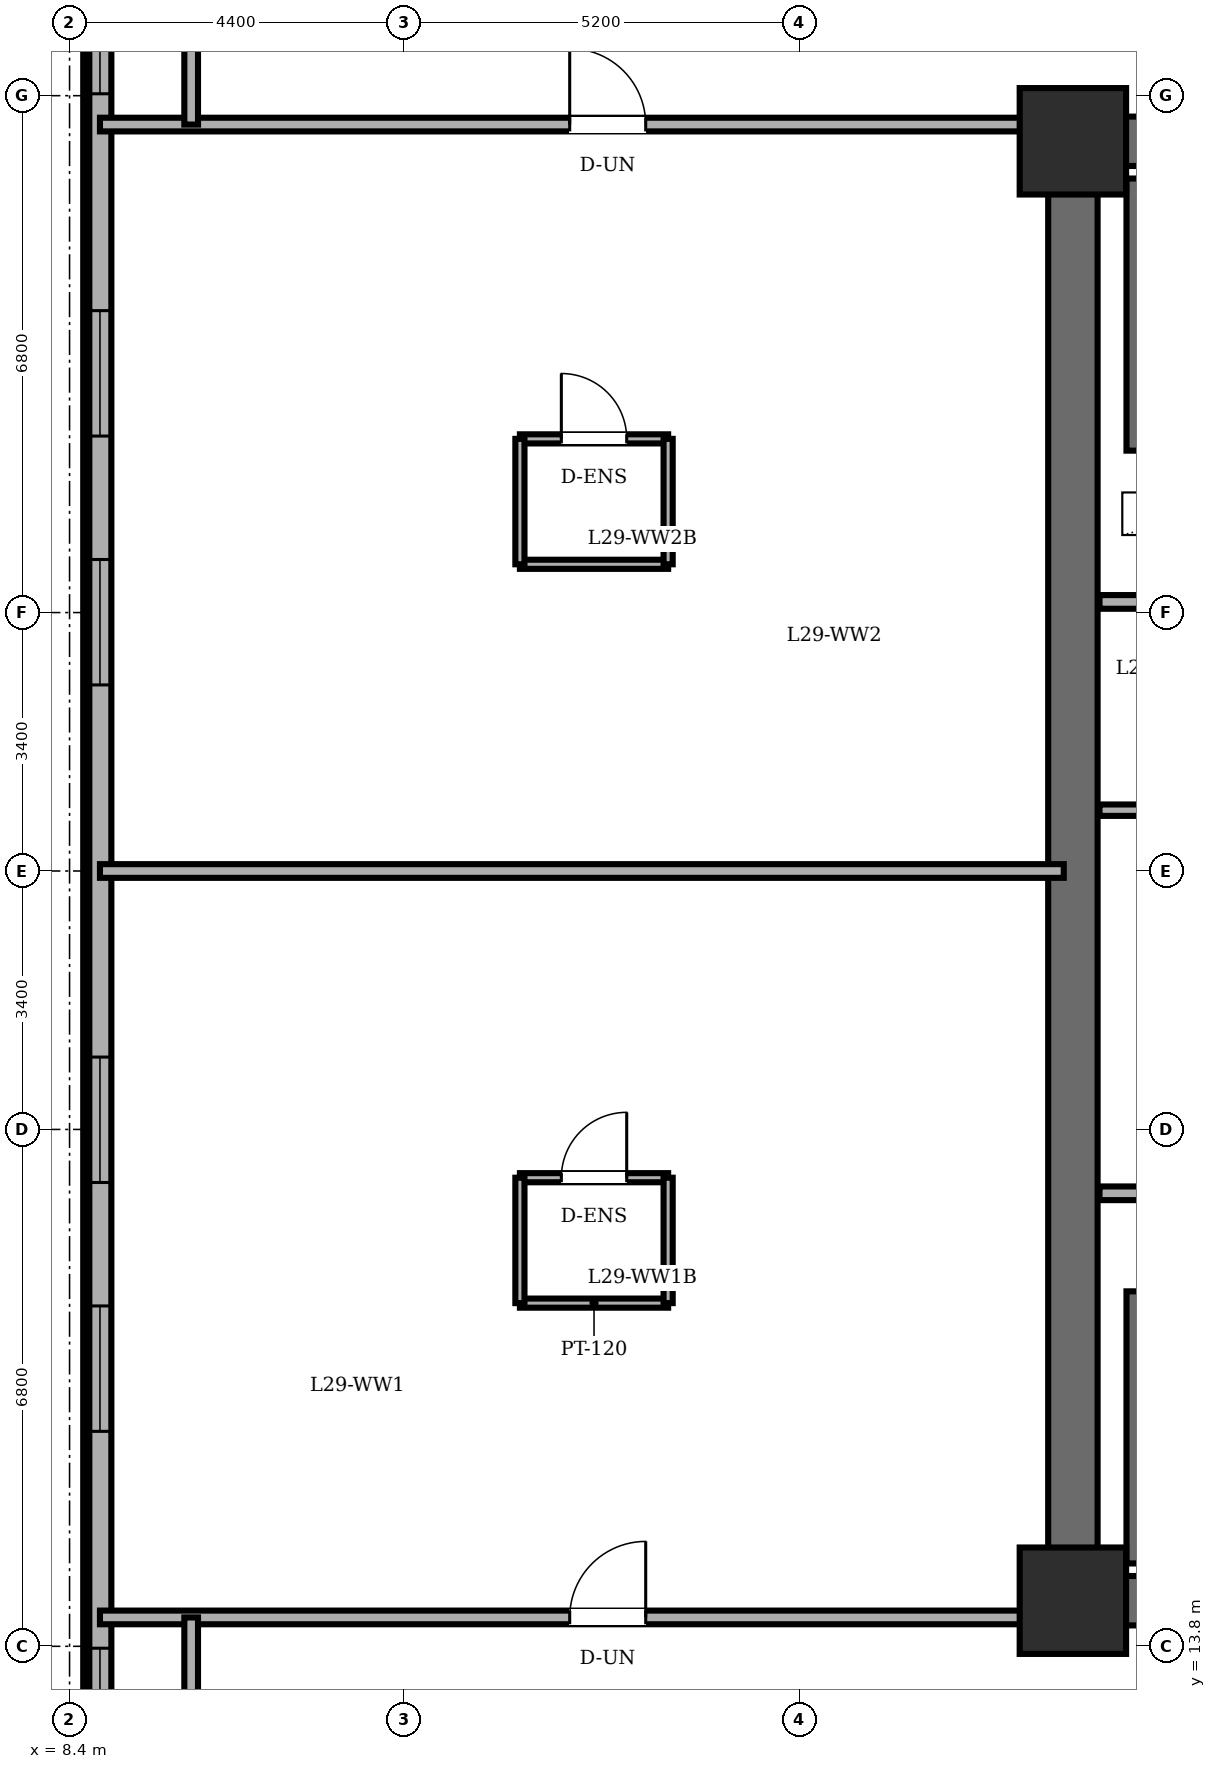
"""IFC4 building model, lengths in metres.
Left out: names, types, materials, properties, quantities, classifications, styles, units other than length and angle.
Written with IfcOpenShell. Run it as: python <this file> out.ifc"""

import sys

from ifc_helpers import new_model, si_unit, direction, frame, frame_2d, origin, origin_2d, place, context, subcontext, project, spatial, rectangle, extrude, element, fill, save


model = new_model("IFC4")
c1 = context("Model", 3, precision=1e-05, world=origin(), true_north=direction((0.0, 1.0)))
c2 = subcontext(c1, "Body", "Model", "MODEL_VIEW")
j1 = project(units=[si_unit("LENGTHUNIT", "METRE"), si_unit("PLANEANGLEUNIT", "RADIAN")], contexts=[c1])
p1 = place(None, origin())
s1 = spatial("IfcSite", under=j1, at=p1, CompositionType="ELEMENT")
p2 = place(p1, origin())
s2 = spatial("IfcBuilding", under=s1, at=p2, CompositionType="ELEMENT")
p3 = place(p2, frame((0.0, 0.0, 111.5)))
s3 = spatial("IfcBuildingStorey", under=s2, at=p3, CompositionType="ELEMENT", Elevation=111.5)
for number, where, z_axis, x_axis in (
    (1, (21.6, 14.4, 0.0), (0.0, 0.0, 1.0), (1.0, 0.0, 0.0)),
    (2, (21.6, 33.6, 0.0), (0.0, 0.0, 1.0), (1.0, 0.0, 0.0)),
):
    element("IfcColumn", number, at=place(p3, frame(where, z_axis=z_axis, x_axis=x_axis)), inside=s3, PredefinedType="COLUMN", context=c2, shape_type="SweptSolid", body=[
        extrude(rectangle(XDim=1.4, YDim=1.4, at=origin_2d()), origin(), (0.0, 0.0, 1.0), 3.6),
    ])
p4 = place(p3, frame((8.8, 38.2, 0.0), z_axis=(0.0, 0.0, 1.0), x_axis=(0.0, -1.0, 0.0)))
e3 = element("IfcWall", 3, at=p4, inside=s3, PredefinedType="SOLIDWALL", context=c2, shape_type="SweptSolid", body=[
    extrude(rectangle(XDim=28.4, YDim=0.3, at=frame_2d((14.2, 0.0))), origin(), (0.0, 0.0, 1.0), 3.4),
])
p5 = place(p4, frame((2.325, 0.0, 0.85)))
e4 = element("IfcOpeningElement", 4, at=p5, cuts=e3, PredefinedType="OPENING", context=c2, shape_type="SweptSolid", body=[
    extrude(rectangle(XDim=1.65, YDim=1.55, at=frame_2d((0.825, 0.775))), frame((0.0, 0.16, 0.0), z_axis=(0.0, -1.0, 0.0), x_axis=(1.0, 0.0, 0.0)), (0.0, 0.0, 1.0), 0.32),
])
p6 = place(p4, frame((6.828, 0.0, 0.85)))
e5 = element("IfcOpeningElement", 5, at=p6, cuts=e3, PredefinedType="OPENING", context=c2, shape_type="SweptSolid", body=[
    extrude(rectangle(XDim=1.65, YDim=1.55, at=frame_2d((0.825, 0.775))), frame((0.0, 0.16, 0.0), z_axis=(0.0, -1.0, 0.0), x_axis=(1.0, 0.0, 0.0)), (0.0, 0.0, 1.0), 0.32),
])
p7 = place(p4, frame((10.102, 0.0, 0.85)))
e6 = element("IfcOpeningElement", 6, at=p7, cuts=e3, PredefinedType="OPENING", context=c2, shape_type="SweptSolid", body=[
    extrude(rectangle(XDim=1.65, YDim=1.55, at=frame_2d((0.825, 0.775))), frame((0.0, 0.16, 0.0), z_axis=(0.0, -1.0, 0.0), x_axis=(1.0, 0.0, 0.0)), (0.0, 0.0, 1.0), 0.32),
])
p8 = place(p4, frame((16.648, 0.0, 0.85)))
e7 = element("IfcOpeningElement", 7, at=p8, cuts=e3, PredefinedType="OPENING", context=c2, shape_type="SweptSolid", body=[
    extrude(rectangle(XDim=1.65, YDim=1.55, at=frame_2d((0.825, 0.775))), frame((0.0, 0.16, 0.0), z_axis=(0.0, -1.0, 0.0), x_axis=(1.0, 0.0, 0.0)), (0.0, 0.0, 1.0), 0.32),
])
p9 = place(p4, frame((19.922, 0.0, 0.85)))
e8 = element("IfcOpeningElement", 8, at=p9, cuts=e3, PredefinedType="OPENING", context=c2, shape_type="SweptSolid", body=[
    extrude(rectangle(XDim=1.65, YDim=1.55, at=frame_2d((0.825, 0.775))), frame((0.0, 0.16, 0.0), z_axis=(0.0, -1.0, 0.0), x_axis=(1.0, 0.0, 0.0)), (0.0, 0.0, 1.0), 0.32),
])
p10 = place(p4, frame((24.425, 0.0, 0.85)))
e9 = element("IfcOpeningElement", 9, at=p10, cuts=e3, PredefinedType="OPENING", context=c2, shape_type="SweptSolid", body=[
    extrude(rectangle(XDim=1.65, YDim=1.55, at=frame_2d((0.825, 0.775))), frame((0.0, 0.16, 0.0), z_axis=(0.0, -1.0, 0.0), x_axis=(1.0, 0.0, 0.0)), (0.0, 0.0, 1.0), 0.32),
])
p11 = place(p3, frame((21.6, 14.4, 0.0), z_axis=(0.0, 0.0, 1.0), x_axis=(0.0, 1.0, 0.0)))
e10 = element("IfcWall", 10, at=p11, inside=s3, PredefinedType="SHEAR", context=c2, shape_type="SweptSolid", body=[
    extrude(rectangle(XDim=19.2, YDim=0.65, at=frame_2d((9.6, 0.0))), origin(), (0.0, 0.0, 1.0), 3.4),
])
for number, where, z_axis, x_axis in (
    (11, (21.6, 33.6, 0.0), (0.0, 0.0, 1.0), (1.0, 0.0, 0.0)),
    (12, (37.2, 14.4, 0.0), (0.0, 0.0, 1.0), (-1.0, 0.0, 0.0)),
):
    element("IfcWall", number, at=place(p3, frame(where, z_axis=z_axis, x_axis=x_axis)), inside=s3, PredefinedType="SHEAR", context=c2, shape_type="SweptSolid", body=[
        extrude(rectangle(XDim=15.6, YDim=0.65, at=frame_2d((7.8, 0.0))), origin(), (0.0, 0.0, 1.0), 3.4),
    ])
for number, where, z_axis, x_axis in (
    (13, (22.48, 29.53, 0.0), (0.0, 0.0, 1.0), (0.0, 1.0, 0.0)),
    (14, (22.48, 14.89, 0.0), (0.0, 0.0, 1.0), (0.0, 1.0, 0.0)),
):
    element("IfcWall", number, at=place(p3, frame(where, z_axis=z_axis, x_axis=x_axis)), inside=s3, PredefinedType="SOLIDWALL", context=c2, shape_type="SweptSolid", body=[
        extrude(rectangle(XDim=3.58, YDim=0.35, at=frame_2d((1.79, 0.0))), origin(), (0.0, 0.0, 1.0), 3.4),
    ])
p12 = place(p3, frame((21.95, 27.54, 0.0), z_axis=(0.0, 0.0, 1.0), x_axis=(1.0, 0.0, 0.0)))
e15 = element("IfcWall", 15, at=p12, inside=s3, PredefinedType="PARTITIONING", context=c2, shape_type="SweptSolid", body=[
    extrude(rectangle(XDim=10.56, YDim=0.18, at=frame_2d((5.28, 0.0))), origin(), (0.0, 0.0, 1.0), 3.4),
])
p13 = place(p3, frame((21.95, 19.76, 0.0), z_axis=(0.0, 0.0, 1.0), x_axis=(1.0, 0.0, 0.0)))
e16 = element("IfcWall", 16, at=p13, inside=s3, PredefinedType="PARTITIONING", context=c2, shape_type="SweptSolid", body=[
    extrude(rectangle(XDim=14.87, YDim=0.18, at=frame_2d((7.435, 0.0))), origin(), (0.0, 0.0, 1.0), 3.4),
])
p14 = place(p3, frame((21.95, 24.8, 0.0), z_axis=(0.0, 0.0, 1.0), x_axis=(1.0, 0.0, 0.0)))
e17 = element("IfcWall", 17, at=p14, inside=s3, PredefinedType="PARTITIONING", context=c2, shape_type="SweptSolid", body=[
    extrude(rectangle(XDim=2.51, YDim=0.15, at=frame_2d((1.255, 0.0))), origin(), (0.0, 0.0, 1.0), 3.4),
])
p15 = place(p3, frame((14.325, 19.965, 0.0), z_axis=(0.0, 0.0, 1.0), x_axis=(1.0, 0.0, 0.0)))
e18 = element("IfcWall", 18, at=p15, inside=s3, PredefinedType="PARTITIONING", context=c2, shape_type="SweptSolid", body=[
    extrude(rectangle(XDim=1.95, YDim=0.12, at=frame_2d((0.975, 0.0))), origin(), (0.0, 0.0, 1.0), 3.4),
])
p16 = place(p15, frame((0.545, 0.0, 0.0)))
e19 = element("IfcOpeningElement", 19, at=p16, cuts=e18, PredefinedType="OPENING", context=c2, shape_type="SweptSolid", body=[
    extrude(rectangle(XDim=0.86, YDim=2.1, at=frame_2d((0.43, 1.05))), frame((0.0, 0.07, 0.0), z_axis=(0.0, -1.0, 0.0), x_axis=(1.0, 0.0, 0.0)), (0.0, 0.0, 1.0), 0.14),
])
p17 = place(p3, frame((16.275, 18.315, 0.0), z_axis=(0.0, 0.0, 1.0), x_axis=(-1.0, 0.0, 0.0)))
e20 = element("IfcWall", 20, at=p17, inside=s3, PredefinedType="PARTITIONING", context=c2, shape_type="SweptSolid", body=[
    extrude(rectangle(XDim=1.95, YDim=0.12, at=frame_2d((0.975, 0.0))), origin(), (0.0, 0.0, 1.0), 3.4),
])
for number, where, z_axis, x_axis in (
    (21, (14.325, 19.965, 0.0), (0.0, 0.0, 1.0), (0.0, -1.0, 0.0)),
    (22, (16.275, 18.315, 0.0), (0.0, 0.0, 1.0), (0.0, 1.0, 0.0)),
):
    element("IfcWall", number, at=place(p3, frame(where, z_axis=z_axis, x_axis=x_axis)), inside=s3, PredefinedType="PARTITIONING", context=c2, shape_type="SweptSolid", body=[
        extrude(rectangle(XDim=1.65, YDim=0.12, at=frame_2d((0.825, 0.0))), origin(), (0.0, 0.0, 1.0), 3.4),
    ])
p18 = place(p3, frame((14.325, 29.685, 0.0), z_axis=(0.0, 0.0, 1.0), x_axis=(1.0, 0.0, 0.0)))
e23 = element("IfcWall", 23, at=p18, inside=s3, PredefinedType="PARTITIONING", context=c2, shape_type="SweptSolid", body=[
    extrude(rectangle(XDim=1.95, YDim=0.12, at=frame_2d((0.975, 0.0))), origin(), (0.0, 0.0, 1.0), 3.4),
])
p19 = place(p18, frame((0.545, 0.0, 0.0)))
e24 = element("IfcOpeningElement", 24, at=p19, cuts=e23, PredefinedType="OPENING", context=c2, shape_type="SweptSolid", body=[
    extrude(rectangle(XDim=0.86, YDim=2.1, at=frame_2d((0.43, 1.05))), frame((0.0, 0.07, 0.0), z_axis=(0.0, -1.0, 0.0), x_axis=(1.0, 0.0, 0.0)), (0.0, 0.0, 1.0), 0.14),
])
p20 = place(p3, frame((16.275, 28.035, 0.0), z_axis=(0.0, 0.0, 1.0), x_axis=(-1.0, 0.0, 0.0)))
e25 = element("IfcWall", 25, at=p20, inside=s3, PredefinedType="PARTITIONING", context=c2, shape_type="SweptSolid", body=[
    extrude(rectangle(XDim=1.95, YDim=0.12, at=frame_2d((0.975, 0.0))), origin(), (0.0, 0.0, 1.0), 3.4),
])
for number, where, z_axis, x_axis in (
    (26, (14.325, 29.685, 0.0), (0.0, 0.0, 1.0), (0.0, -1.0, 0.0)),
    (27, (16.275, 28.035, 0.0), (0.0, 0.0, 1.0), (0.0, 1.0, 0.0)),
):
    element("IfcWall", number, at=place(p3, frame(where, z_axis=z_axis, x_axis=x_axis)), inside=s3, PredefinedType="PARTITIONING", context=c2, shape_type="SweptSolid", body=[
        extrude(rectangle(XDim=1.65, YDim=0.12, at=frame_2d((0.825, 0.0))), origin(), (0.0, 0.0, 1.0), 3.4),
    ])
p21 = place(p3, frame((8.8, 14.18, 0.0), z_axis=(0.0, 0.0, 1.0), x_axis=(1.0, 0.0, 0.0)))
e28 = element("IfcWall", 28, at=p21, inside=s3, PredefinedType="PARTITIONING", context=c2, shape_type="SweptSolid", body=[
    extrude(rectangle(XDim=12.68, YDim=0.18, at=frame_2d((6.34, 0.0))), origin(), (0.0, 0.0, 1.0), 3.4),
])
p22 = place(p21, frame((6.18, 0.0, 0.0)))
e29 = element("IfcOpeningElement", 29, at=p22, cuts=e28, PredefinedType="OPENING", context=c2, shape_type="SweptSolid", body=[
    extrude(rectangle(XDim=1.0, YDim=2.15, at=frame_2d((0.5, 1.075))), frame((0.0, 0.1, 0.0), z_axis=(0.0, -1.0, 0.0), x_axis=(1.0, 0.0, 0.0)), (0.0, 0.0, 1.0), 0.2),
])
p23 = place(p3, frame((8.8, 24.0, 0.0), z_axis=(0.0, 0.0, 1.0), x_axis=(1.0, 0.0, 0.0)))
e30 = element("IfcWall", 30, at=p23, inside=s3, PredefinedType="PARTITIONING", context=c2, shape_type="SweptSolid", body=[
    extrude(rectangle(XDim=12.68, YDim=0.18, at=frame_2d((6.34, 0.0))), origin(), (0.0, 0.0, 1.0), 3.4),
])
p24 = place(p3, frame((8.8, 33.82, 0.0), z_axis=(0.0, 0.0, 1.0), x_axis=(1.0, 0.0, 0.0)))
e31 = element("IfcWall", 31, at=p24, inside=s3, PredefinedType="PARTITIONING", context=c2, shape_type="SweptSolid", body=[
    extrude(rectangle(XDim=12.68, YDim=0.18, at=frame_2d((6.34, 0.0))), origin(), (0.0, 0.0, 1.0), 3.4),
])
p25 = place(p24, frame((6.18, 0.0, 0.0)))
e32 = element("IfcOpeningElement", 32, at=p25, cuts=e31, PredefinedType="OPENING", context=c2, shape_type="SweptSolid", body=[
    extrude(rectangle(XDim=1.0, YDim=2.15, at=frame_2d((0.5, 1.075))), frame((0.0, 0.1, 0.0), z_axis=(0.0, -1.0, 0.0), x_axis=(1.0, 0.0, 0.0)), (0.0, 0.0, 1.0), 0.2),
])
for number, where, z_axis, x_axis in (
    (33, (10.0, 11.72, 0.0), (0.0, 0.0, 1.0), (0.0, 1.0, 0.0)),
    (34, (10.0, 33.82, 0.0), (0.0, 0.0, 1.0), (0.0, 1.0, 0.0)),
):
    element("IfcWall", number, at=place(p3, frame(where, z_axis=z_axis, x_axis=x_axis)), inside=s3, PredefinedType="PARTITIONING", context=c2, shape_type="SweptSolid", body=[
        extrude(rectangle(XDim=2.46, YDim=0.18, at=frame_2d((1.23, 0.0))), origin(), (0.0, 0.0, 1.0), 3.4),
    ])
p26 = place(p5, origin())
e35 = element("IfcWindow", 35, at=p26, inside=s3, PartitioningType="DOUBLE_PANEL_VERTICAL", PredefinedType="WINDOW", context=c2, shape_type="SweptSolid", body=[
    extrude(rectangle(XDim=1.65, YDim=1.55, at=frame_2d((0.825, 0.775))), frame((0.0, 0.03, 0.0), z_axis=(0.0, -1.0, 0.0), x_axis=(1.0, 0.0, 0.0)), (0.0, 0.0, 1.0), 0.06),
])
fill(e4, e35)
p27 = place(p6, origin())
e36 = element("IfcWindow", 36, at=p27, inside=s3, PartitioningType="DOUBLE_PANEL_VERTICAL", PredefinedType="WINDOW", context=c2, shape_type="SweptSolid", body=[
    extrude(rectangle(XDim=1.65, YDim=1.55, at=frame_2d((0.825, 0.775))), frame((0.0, 0.03, 0.0), z_axis=(0.0, -1.0, 0.0), x_axis=(1.0, 0.0, 0.0)), (0.0, 0.0, 1.0), 0.06),
])
fill(e5, e36)
p28 = place(p7, origin())
e37 = element("IfcWindow", 37, at=p28, inside=s3, PartitioningType="DOUBLE_PANEL_VERTICAL", PredefinedType="WINDOW", context=c2, shape_type="SweptSolid", body=[
    extrude(rectangle(XDim=1.65, YDim=1.55, at=frame_2d((0.825, 0.775))), frame((0.0, 0.03, 0.0), z_axis=(0.0, -1.0, 0.0), x_axis=(1.0, 0.0, 0.0)), (0.0, 0.0, 1.0), 0.06),
])
fill(e6, e37)
p29 = place(p8, origin())
e38 = element("IfcWindow", 38, at=p29, inside=s3, PartitioningType="DOUBLE_PANEL_VERTICAL", PredefinedType="WINDOW", context=c2, shape_type="SweptSolid", body=[
    extrude(rectangle(XDim=1.65, YDim=1.55, at=frame_2d((0.825, 0.775))), frame((0.0, 0.03, 0.0), z_axis=(0.0, -1.0, 0.0), x_axis=(1.0, 0.0, 0.0)), (0.0, 0.0, 1.0), 0.06),
])
fill(e7, e38)
p30 = place(p9, origin())
e39 = element("IfcWindow", 39, at=p30, inside=s3, PartitioningType="DOUBLE_PANEL_VERTICAL", PredefinedType="WINDOW", context=c2, shape_type="SweptSolid", body=[
    extrude(rectangle(XDim=1.65, YDim=1.55, at=frame_2d((0.825, 0.775))), frame((0.0, 0.03, 0.0), z_axis=(0.0, -1.0, 0.0), x_axis=(1.0, 0.0, 0.0)), (0.0, 0.0, 1.0), 0.06),
])
fill(e8, e39)
p31 = place(p10, origin())
e40 = element("IfcWindow", 40, at=p31, inside=s3, PartitioningType="DOUBLE_PANEL_VERTICAL", PredefinedType="WINDOW", context=c2, shape_type="SweptSolid", body=[
    extrude(rectangle(XDim=1.65, YDim=1.55, at=frame_2d((0.825, 0.775))), frame((0.0, 0.03, 0.0), z_axis=(0.0, -1.0, 0.0), x_axis=(1.0, 0.0, 0.0)), (0.0, 0.0, 1.0), 0.06),
])
fill(e9, e40)
p32 = place(p16, origin())
e41 = element("IfcDoor", 41, at=p32, inside=s3, OperationType="SINGLE_SWING_RIGHT", PredefinedType="DOOR", context=c2, shape_type="SweptSolid", body=[
    extrude(rectangle(XDim=0.86, YDim=2.1, at=frame_2d((0.43, 1.05))), frame((0.0, 0.025, 0.0), z_axis=(0.0, -1.0, 0.0), x_axis=(1.0, 0.0, 0.0)), (0.0, 0.0, 1.0), 0.05),
])
fill(e19, e41)
p33 = place(p19, origin())
e42 = element("IfcDoor", 42, at=p33, inside=s3, OperationType="SINGLE_SWING_LEFT", PredefinedType="DOOR", context=c2, shape_type="SweptSolid", body=[
    extrude(rectangle(XDim=0.86, YDim=2.1, at=frame_2d((0.43, 1.05))), frame((0.0, 0.025, 0.0), z_axis=(0.0, -1.0, 0.0), x_axis=(1.0, 0.0, 0.0)), (0.0, 0.0, 1.0), 0.05),
])
fill(e24, e42)
p34 = place(p22, origin())
e43 = element("IfcDoor", 43, at=p34, inside=s3, OperationType="SINGLE_SWING_RIGHT", PredefinedType="DOOR", context=c2, shape_type="SweptSolid", body=[
    extrude(rectangle(XDim=1.0, YDim=2.15, at=frame_2d((0.5, 1.075))), frame((0.0, 0.025, 0.0), z_axis=(0.0, -1.0, 0.0), x_axis=(1.0, 0.0, 0.0)), (0.0, 0.0, 1.0), 0.05),
])
fill(e29, e43)
p35 = place(p25, origin())
e44 = element("IfcDoor", 44, at=p35, inside=s3, OperationType="SINGLE_SWING_LEFT", PredefinedType="DOOR", context=c2, shape_type="SweptSolid", body=[
    extrude(rectangle(XDim=1.0, YDim=2.15, at=frame_2d((0.5, 1.075))), frame((0.0, 0.025, 0.0), z_axis=(0.0, -1.0, 0.0), x_axis=(1.0, 0.0, 0.0)), (0.0, 0.0, 1.0), 0.05),
])
fill(e32, e44)
save(model, sys.argv[1])
